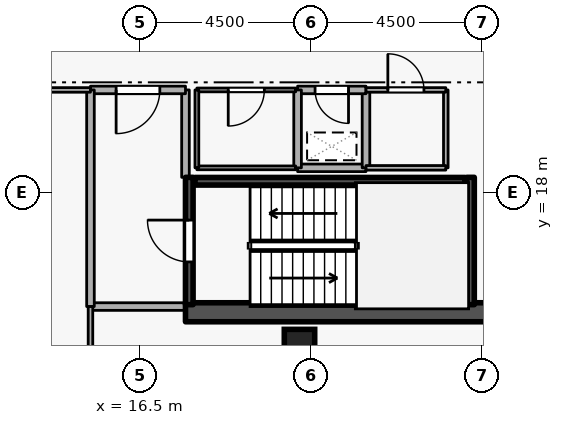
"""IFC4 building model, lengths in metres.
Left out: names, types, materials, properties, quantities, classifications, styles, units other than length and angle.
Written with IfcOpenShell. Run it as: python <this file> out.ifc"""

import sys

from ifc_helpers import new_model, si_unit, direction, frame, frame_2d, origin, origin_2d, place, context, subcontext, project, spatial, rectangle, extrude, element, fill, save


model = new_model("IFC4")
c1 = context("Model", 3, precision=1e-05, world=origin(), true_north=direction((0.0, 1.0)))
c2 = subcontext(c1, "Body", "Model", "MODEL_VIEW")
j1 = project(units=[si_unit("LENGTHUNIT", "METRE"), si_unit("PLANEANGLEUNIT", "RADIAN")], contexts=[c1])
p1 = place(None, origin())
s1 = spatial("IfcSite", under=j1, at=p1, CompositionType="ELEMENT")
p2 = place(p1, origin())
s2 = spatial("IfcBuilding", under=s1, at=p2, CompositionType="ELEMENT")
p3 = place(p2, frame((0.0, 0.0, 261.9)))
s3 = spatial("IfcBuildingStorey", under=s2, at=p3, CompositionType="ELEMENT", Elevation=261.9)
p4 = place(p3, frame((17.7, 14.85, 0.0), z_axis=(0.0, 0.0, 1.0), x_axis=(1.0, 0.0, 0.0)))
e1 = element("IfcWall", 1, at=p4, inside=s3, PredefinedType="SHEAR", context=c2, shape_type="SweptSolid", body=[
    extrude(rectangle(XDim=15.6, YDim=0.5, at=frame_2d((7.8, 0.0))), origin(), (0.0, 0.0, 1.0), 3.6),
])
p5 = place(p3, frame((20.7, 14.0, 0.0), z_axis=(0.0, 0.0, 1.0), x_axis=(1.0, 0.0, 0.0)))
e2 = element("IfcColumn", 2, at=p5, inside=s3, PredefinedType="COLUMN", context=c2, shape_type="SweptSolid", body=[
    extrude(rectangle(XDim=0.8, YDim=0.8, at=origin_2d()), origin(), (0.0, 0.0, 1.0), 3.6),
])
p6 = place(p3, frame((17.8, 15.05, 0.0), z_axis=(0.0, 0.0, 1.0), x_axis=(0.0, 1.0, 0.0)))
e3 = element("IfcWall", 3, at=p6, inside=s3, PredefinedType="SHEAR", context=c2, shape_type="SweptSolid", body=[
    extrude(rectangle(XDim=3.35, YDim=0.2, at=frame_2d((1.675, 0.0))), origin(), (0.0, 0.0, 1.0), 3.6),
])
p7 = place(p6, frame((1.125, 0.0, 0.0)))
e4 = element("IfcOpeningElement", 4, at=p7, cuts=e3, PredefinedType="OPENING", context=c2, shape_type="SweptSolid", body=[
    extrude(rectangle(XDim=1.1, YDim=2.1, at=frame_2d((0.55, 1.05))), frame((0.0, 0.11, 0.0), z_axis=(0.0, -1.0, 0.0), x_axis=(1.0, 0.0, 0.0)), (0.0, 0.0, 1.0), 0.22),
])
p8 = place(p3, frame((25.2, 18.4, 0.0), z_axis=(0.0, 0.0, 1.0), x_axis=(0.0, -1.0, 0.0)))
e5 = element("IfcWall", 5, at=p8, inside=s3, PredefinedType="SHEAR", context=c2, shape_type="SweptSolid", body=[
    extrude(rectangle(XDim=3.35, YDim=0.2, at=frame_2d((1.675, 0.0))), origin(), (0.0, 0.0, 1.0), 3.6),
])
p9 = place(p3, frame((25.05, 18.297, 0.0), z_axis=(0.0, 0.0, 1.0), x_axis=(-1.0, 0.0, 0.0)))
e6 = element("IfcWall", 6, at=p9, inside=s3, PredefinedType="SHEAR", context=c2, shape_type="SweptSolid", body=[
    extrude(rectangle(XDim=7.1, YDim=0.2, at=frame_2d((3.55, 0.0))), origin(), (0.0, 0.0, 1.0), 3.6),
])
p10 = place(p3, frame((15.2, 15.0, 0.0), z_axis=(0.0, 0.0, 1.0), x_axis=(1.0, 0.0, 0.0)))
e7 = element("IfcWall", 7, at=p10, inside=s3, PredefinedType="STANDARD", context=c2, shape_type="SweptSolid", body=[
    extrude(rectangle(XDim=2.5, YDim=0.2, at=frame_2d((1.25, 0.0))), origin(), (0.0, 0.0, 1.0), 3.34),
])
p11 = place(p3, frame((17.7, 18.4, 0.0), z_axis=(0.0, 0.0, 1.0), x_axis=(0.0, 1.0, 0.0)))
e8 = element("IfcWall", 8, at=p11, inside=s3, PredefinedType="STANDARD", context=c2, shape_type="SweptSolid", body=[
    extrude(rectangle(XDim=2.3, YDim=0.2, at=frame_2d((1.15, 0.0))), origin(), (0.0, 0.0, 1.0), 2.545),
])
p12 = place(p3, frame((17.7, 20.7, 0.0), z_axis=(0.0, 0.0, 1.0), x_axis=(-1.0, 0.0, 0.0)))
e9 = element("IfcWall", 9, at=p12, inside=s3, PredefinedType="STANDARD", context=c2, shape_type="SweptSolid", body=[
    extrude(rectangle(XDim=2.5, YDim=0.2, at=frame_2d((1.25, 0.0))), origin(), (0.0, 0.0, 1.0), 3.34),
])
p13 = place(p12, frame((0.675, 0.0, 0.0)))
e10 = element("IfcOpeningElement", 10, at=p13, cuts=e9, PredefinedType="OPENING", context=c2, shape_type="SweptSolid", body=[
    extrude(rectangle(XDim=1.15, YDim=2.1, at=frame_2d((0.575, 1.05))), frame((0.0, 0.11, 0.0), z_axis=(0.0, -1.0, 0.0), x_axis=(1.0, 0.0, 0.0)), (0.0, 0.0, 1.0), 0.22),
])
p14 = place(p3, frame((15.2, 20.7, 0.0), z_axis=(0.0, 0.0, 1.0), x_axis=(0.0, -1.0, 0.0)))
e11 = element("IfcWall", 11, at=p14, inside=s3, PredefinedType="STANDARD", context=c2, shape_type="SweptSolid", body=[
    extrude(rectangle(XDim=5.7, YDim=0.2, at=frame_2d((2.85, 0.0))), origin(), (0.0, 0.0, 1.0), 3.34),
])
p15 = place(p3, frame((20.65, 18.65, 0.0), z_axis=(0.0, 0.0, 1.0), x_axis=(1.0, 0.0, 0.0)))
e12 = element("IfcWall", 12, at=p15, inside=s3, PredefinedType="STANDARD", context=c2, shape_type="SweptSolid", body=[
    extrude(rectangle(XDim=1.8, YDim=0.2, at=frame_2d((0.9, 0.0))), origin(), (0.0, 0.0, 1.0), 3.34),
])
p16 = place(p3, frame((22.45, 18.65, 0.0), z_axis=(0.0, 0.0, 1.0), x_axis=(0.0, 1.0, 0.0)))
e13 = element("IfcWall", 13, at=p16, inside=s3, PredefinedType="STANDARD", context=c2, shape_type="SweptSolid", body=[
    extrude(rectangle(XDim=2.05, YDim=0.2, at=frame_2d((1.025, 0.0))), origin(), (0.0, 0.0, 1.0), 3.34),
])
p17 = place(p3, frame((22.45, 20.7, 0.0), z_axis=(0.0, 0.0, 1.0), x_axis=(-1.0, 0.0, 0.0)))
e14 = element("IfcWall", 14, at=p17, inside=s3, PredefinedType="STANDARD", context=c2, shape_type="SweptSolid", body=[
    extrude(rectangle(XDim=1.8, YDim=0.2, at=frame_2d((0.9, 0.0))), origin(), (0.0, 0.0, 1.0), 3.34),
])
p18 = place(p17, frame((0.46, 0.0, 0.0)))
e15 = element("IfcOpeningElement", 15, at=p18, cuts=e14, PredefinedType="OPENING", context=c2, shape_type="SweptSolid", body=[
    extrude(rectangle(XDim=0.88, YDim=2.04, at=frame_2d((0.44, 1.02))), frame((0.0, 0.11, 0.0), z_axis=(0.0, -1.0, 0.0), x_axis=(1.0, 0.0, 0.0)), (0.0, 0.0, 1.0), 0.22),
])
p19 = place(p3, frame((20.65, 20.7, 0.0), z_axis=(0.0, 0.0, 1.0), x_axis=(0.0, -1.0, 0.0)))
e16 = element("IfcWall", 16, at=p19, inside=s3, PredefinedType="STANDARD", context=c2, shape_type="SweptSolid", body=[
    extrude(rectangle(XDim=2.05, YDim=0.2, at=frame_2d((1.025, 0.0))), origin(), (0.0, 0.0, 1.0), 3.34),
])
p20 = place(p3, frame((18.0, 18.65, 0.0), z_axis=(0.0, 0.0, 1.0), x_axis=(1.0, 0.0, 0.0)))
e17 = element("IfcWall", 17, at=p20, inside=s3, PredefinedType="PARTITIONING", context=c2, shape_type="SweptSolid", body=[
    extrude(rectangle(XDim=2.6, YDim=0.1, at=frame_2d((1.3, 0.0))), origin(), (0.0, 0.0, 1.0), 3.34),
])
p21 = place(p3, frame((20.6, 20.7, 0.0), z_axis=(0.0, 0.0, 1.0), x_axis=(-1.0, 0.0, 0.0)))
e18 = element("IfcWall", 18, at=p21, inside=s3, PredefinedType="PARTITIONING", context=c2, shape_type="SweptSolid", body=[
    extrude(rectangle(XDim=2.6, YDim=0.1, at=frame_2d((1.3, 0.0))), origin(), (0.0, 0.0, 1.0), 3.34),
])
p22 = place(p21, frame((0.825, 0.0, 0.0)))
e19 = element("IfcOpeningElement", 19, at=p22, cuts=e18, PredefinedType="OPENING", context=c2, shape_type="SweptSolid", body=[
    extrude(rectangle(XDim=0.95, YDim=2.1, at=frame_2d((0.475, 1.05))), frame((0.0, 0.06, 0.0), z_axis=(0.0, -1.0, 0.0), x_axis=(1.0, 0.0, 0.0)), (0.0, 0.0, 1.0), 0.12),
])
p23 = place(p3, frame((18.0, 20.7, 0.0), z_axis=(0.0, 0.0, 1.0), x_axis=(0.0, -1.0, 0.0)))
e20 = element("IfcWall", 20, at=p23, inside=s3, PredefinedType="PARTITIONING", context=c2, shape_type="SweptSolid", body=[
    extrude(rectangle(XDim=2.05, YDim=0.1, at=frame_2d((1.025, 0.0))), origin(), (0.0, 0.0, 1.0), 2.545),
])
p24 = place(p3, frame((24.55, 20.7, 0.0), z_axis=(0.0, 0.0, 1.0), x_axis=(0.0, -1.0, 0.0)))
e21 = element("IfcWall", 21, at=p24, inside=s3, PredefinedType="PARTITIONING", context=c2, shape_type="SweptSolid", body=[
    extrude(rectangle(XDim=2.05, YDim=0.12, at=frame_2d((1.025, 0.0))), origin(), (0.0, 0.0, 1.0), 3.34),
])
p25 = place(p3, frame((24.55, 18.65, 0.0), z_axis=(0.0, 0.0, 1.0), x_axis=(-1.0, 0.0, 0.0)))
e22 = element("IfcWall", 22, at=p25, inside=s3, PredefinedType="PARTITIONING", context=c2, shape_type="SweptSolid", body=[
    extrude(rectangle(XDim=2.1, YDim=0.12, at=frame_2d((1.05, 0.0))), origin(), (0.0, 0.0, 1.0), 3.34),
])
p26 = place(p3, frame((22.45, 20.7, 0.0), z_axis=(0.0, 0.0, 1.0), x_axis=(1.0, 0.0, 0.0)))
e23 = element("IfcWall", 23, at=p26, inside=s3, PredefinedType="PARTITIONING", context=c2, shape_type="SweptSolid", body=[
    extrude(rectangle(XDim=2.1, YDim=0.12, at=frame_2d((1.05, 0.0))), origin(), (0.0, 0.0, 1.0), 3.34),
])
p27 = place(p26, frame((0.575, 0.0, 0.0)))
e24 = element("IfcOpeningElement", 24, at=p27, cuts=e23, PredefinedType="OPENING", context=c2, shape_type="SweptSolid", body=[
    extrude(rectangle(XDim=0.95, YDim=2.1, at=frame_2d((0.475, 1.05))), frame((0.0, 0.07, 0.0), z_axis=(0.0, -1.0, 0.0), x_axis=(1.0, 0.0, 0.0)), (0.0, 0.0, 1.0), 0.14),
])
p28 = place(p3, frame((13.25, 20.7, 0.0), z_axis=(0.0, 0.0, 1.0), x_axis=(1.0, 0.0, 0.0)))
e25 = element("IfcWall", 25, at=p28, inside=s3, PredefinedType="PARTITIONING", context=c2, shape_type="SweptSolid", body=[
    extrude(rectangle(XDim=1.95, YDim=0.12, at=frame_2d((0.975, 0.0))), origin(), (0.0, 0.0, 1.0), 3.34),
])
p29 = place(p3, frame((15.2, 15.0, 0.0), z_axis=(0.0, 0.0, 1.0), x_axis=(0.0, -1.0, 0.0)))
e26 = element("IfcWall", 26, at=p29, inside=s3, PredefinedType="PARTITIONING", context=c2, shape_type="SweptSolid", body=[
    extrude(rectangle(XDim=11.72, YDim=0.12, at=frame_2d((5.86, 0.0))), origin(), (0.0, 0.0, 1.0), 3.34),
])
p30 = place(p7, origin())
e27 = element("IfcDoor", 27, at=p30, inside=s3, OperationType="SINGLE_SWING_RIGHT", PredefinedType="DOOR", context=c2, shape_type="SweptSolid", body=[
    extrude(rectangle(XDim=1.1, YDim=2.1, at=frame_2d((0.55, 1.05))), frame((0.0, 0.025, 0.0), z_axis=(0.0, -1.0, 0.0), x_axis=(1.0, 0.0, 0.0)), (0.0, 0.0, 1.0), 0.05),
])
fill(e4, e27)
p31 = place(p13, origin())
e28 = element("IfcDoor", 28, at=p31, inside=s3, OperationType="SINGLE_SWING_RIGHT", PredefinedType="DOOR", context=c2, shape_type="SweptSolid", body=[
    extrude(rectangle(XDim=1.15, YDim=2.1, at=frame_2d((0.575, 1.05))), frame((0.0, 0.025, 0.0), z_axis=(0.0, -1.0, 0.0), x_axis=(1.0, 0.0, 0.0)), (0.0, 0.0, 1.0), 0.05),
])
fill(e10, e28)
p32 = place(p18, origin())
e29 = element("IfcDoor", 29, at=p32, inside=s3, OperationType="SINGLE_SWING_LEFT", PredefinedType="DOOR", context=c2, shape_type="SweptSolid", body=[
    extrude(rectangle(XDim=0.88, YDim=2.04, at=frame_2d((0.44, 1.02))), frame((0.0, 0.025, 0.0), z_axis=(0.0, -1.0, 0.0), x_axis=(1.0, 0.0, 0.0)), (0.0, 0.0, 1.0), 0.05),
])
fill(e15, e29)
p33 = place(p22, origin())
e30 = element("IfcDoor", 30, at=p33, inside=s3, OperationType="SINGLE_SWING_RIGHT", PredefinedType="DOOR", context=c2, shape_type="SweptSolid", body=[
    extrude(rectangle(XDim=0.95, YDim=2.1, at=frame_2d((0.475, 1.05))), frame((0.0, 0.025, 0.0), z_axis=(0.0, -1.0, 0.0), x_axis=(1.0, 0.0, 0.0)), (0.0, 0.0, 1.0), 0.05),
])
fill(e19, e30)
p34 = place(p27, origin())
e31 = element("IfcDoor", 31, at=p34, inside=s3, OperationType="SINGLE_SWING_LEFT", PredefinedType="DOOR", context=c2, shape_type="SweptSolid", body=[
    extrude(rectangle(XDim=0.95, YDim=2.1, at=frame_2d((0.475, 1.05))), frame((0.0, 0.025, 0.0), z_axis=(0.0, -1.0, 0.0), x_axis=(1.0, 0.0, 0.0)), (0.0, 0.0, 1.0), 0.05),
])
fill(e24, e31)
save(model, sys.argv[1])
